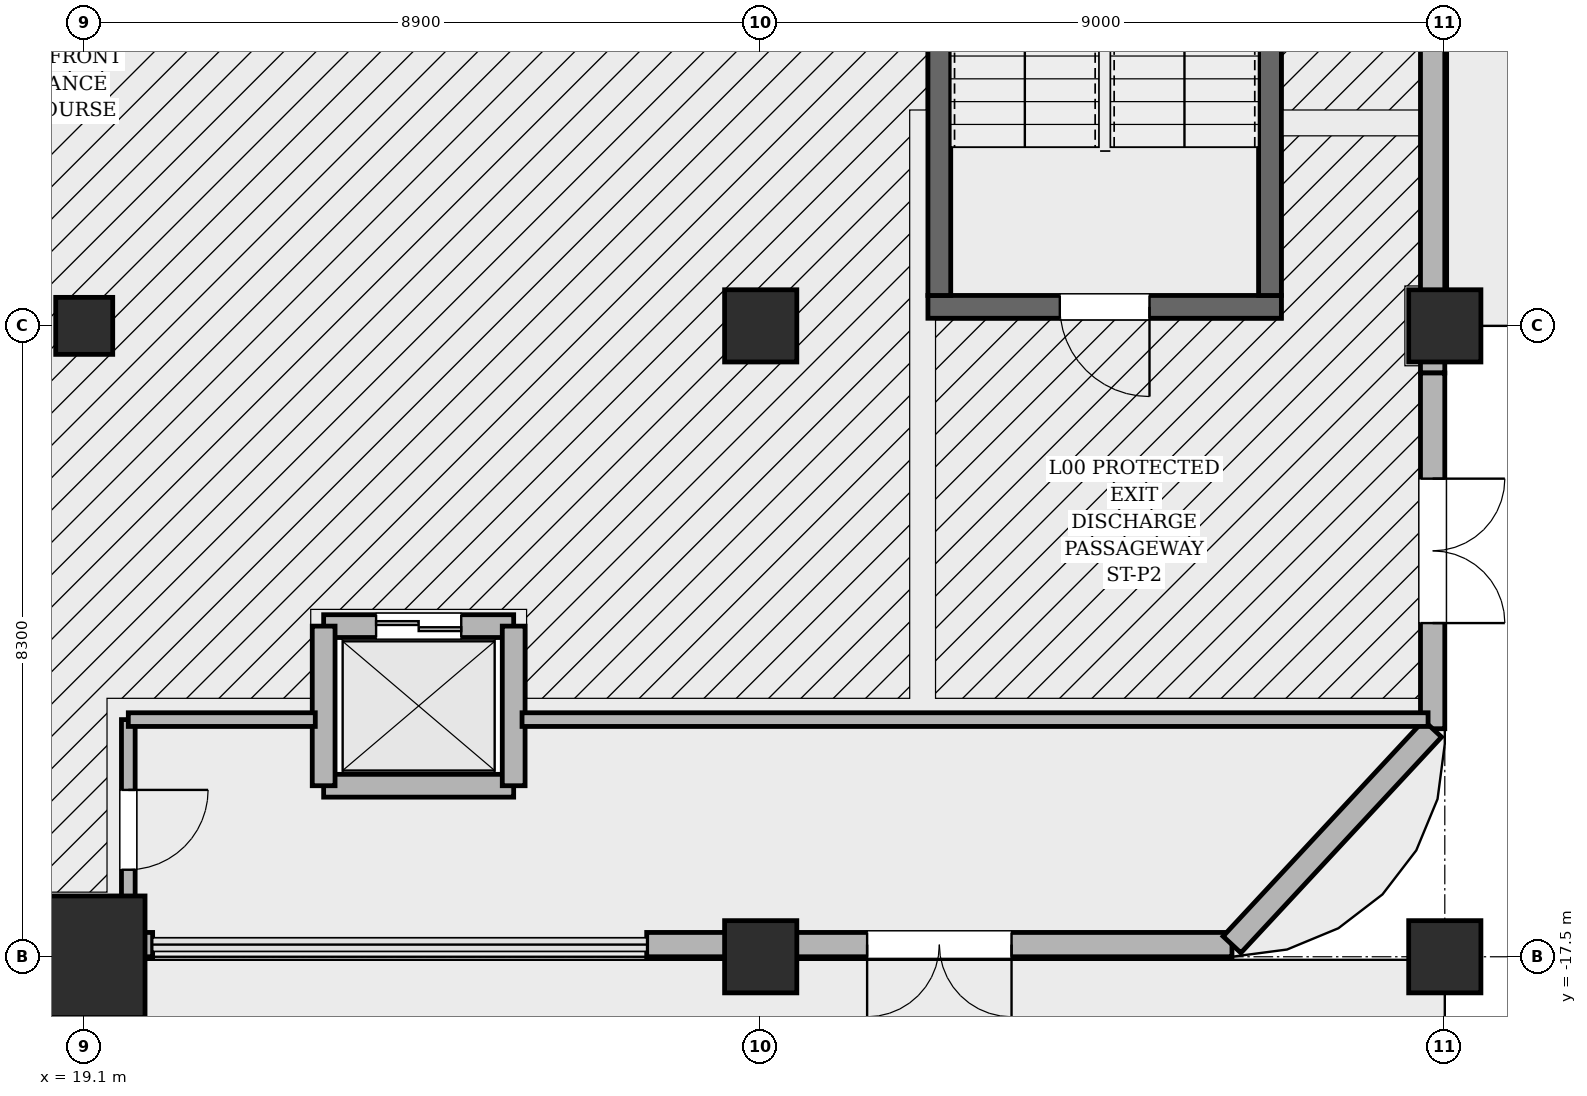
"""IFC4 building model, lengths in metres.
Left out: names, types, materials, properties, quantities, classifications, styles, units other than length and angle.
Written with IfcOpenShell. Run it as: python <this file> out.ifc"""

import sys

from ifc_helpers import new_model, si_unit, direction, frame, frame_2d, origin, origin_2d, place, context, subcontext, project, spatial, rectangle, hollow_rectangle, circle, extrude, element, fill, save


model = new_model("IFC4")
c1 = context("Model", 3, precision=1e-05, world=origin(), true_north=direction((0.0, 1.0)))
c2 = subcontext(c1, "Body", "Model", "MODEL_VIEW")
j1 = project(units=[si_unit("LENGTHUNIT", "METRE"), si_unit("PLANEANGLEUNIT", "RADIAN")], contexts=[c1])
p1 = place(None, origin())
s1 = spatial("IfcSite", under=j1, at=p1, CompositionType="ELEMENT")
p2 = place(p1, origin())
s2 = spatial("IfcBuilding", under=s1, at=p2, CompositionType="ELEMENT")
p3 = place(p2, origin())
s3 = spatial("IfcBuildingStorey", under=s2, at=p3, CompositionType="ELEMENT", Elevation=0.0)
p4 = place(p3, frame((30.2, -8.95, 0.0), z_axis=(0.0, 0.0, 1.0), x_axis=(1.0, 0.0, 0.0)))
e1 = element("IfcWall", 1, at=p4, inside=s3, PredefinedType="SOLIDWALL", context=c2, shape_type="SweptSolid", body=[
    extrude(rectangle(XDim=4.65, YDim=0.3, at=frame_2d((2.325, 0.0))), origin(), (0.0, 0.0, 1.0), 6.0),
])
p5 = place(p4, frame((1.735, 0.0, 0.0)))
e2 = element("IfcOpeningElement", 2, at=p5, cuts=e1, PredefinedType="OPENING", context=c2, shape_type="SweptSolid", body=[
    extrude(rectangle(XDim=1.18, YDim=2.2, at=frame_2d((0.59, 1.1))), frame((0.0, 0.16, 0.0), z_axis=(0.0, -1.0, 0.0), x_axis=(1.0, 0.0, 0.0)), (0.0, 0.0, 1.0), 0.32),
])
for number, where, z_axis, x_axis in (
    (3, (30.35, -8.8, 0.0), (0.0, 0.0, 1.0), (0.0, 1.0, 0.0)),
    (4, (34.7, 1.0, 0.0), (0.0, 0.0, 1.0), (0.0, -1.0, 0.0)),
):
    element("IfcWall", number, at=place(p3, frame(where, z_axis=z_axis, x_axis=x_axis)), inside=s3, PredefinedType="SOLIDWALL", context=c2, shape_type="SweptSolid", body=[
        extrude(rectangle(XDim=9.8, YDim=0.3, at=frame_2d((4.9, 0.0))), origin(), (0.0, 0.0, 1.0), 6.0),
    ])
p6 = place(p3, frame((19.1, -17.5, 0.0), z_axis=(0.0, 0.0, 1.0), x_axis=(1.0, 0.0, 0.0)))
e5 = element("IfcColumn", 5, at=p6, inside=s3, PredefinedType="COLUMN", context=c2, shape_type="SweptSolid", body=[
    extrude(hollow_rectangle(XDim=1.6, YDim=1.6, WallThickness=0.05, at=origin_2d()), origin(), (0.0, 0.0, 1.0), 6.0),
])
for number, where, z_axis, x_axis in (
    (6, (28.0, -17.5, 0.0), (0.0, 0.0, 1.0), (1.0, 0.0, 0.0)),
    (7, (37.0, -17.5, 0.0), (0.0, 0.0, 1.0), (1.0, 0.0, 0.0)),
    (8, (37.0, -9.2, 0.0), (0.0, 0.0, 1.0), (1.0, 0.0, 0.0)),
    (9, (28.0, -9.2, 0.0), (0.0, 0.0, 1.0), (1.0, 0.0, 0.0)),
):
    element("IfcColumn", number, at=place(p3, frame(where, z_axis=z_axis, x_axis=x_axis)), inside=s3, PredefinedType="COLUMN", context=c2, shape_type="SweptSolid", body=[
        extrude(rectangle(XDim=0.95, YDim=0.95, at=origin_2d()), origin(), (0.0, 0.0, 1.0), 6.0),
    ])
p7 = place(p3, frame((19.1, -9.2, 0.0), z_axis=(0.0, 0.0, 1.0), x_axis=(1.0, 0.0, 0.0)))
e10 = element("IfcColumn", 10, at=p7, inside=s3, PredefinedType="PILASTER", context=c2, shape_type="SweptSolid", body=[
    extrude(circle(Radius=0.375, at=origin_2d()), origin(), (0.0, 0.0, 1.0), 6.0),
])
p8 = place(p3, frame((20.0, -17.34, 0.0), z_axis=(0.0, 0.0, 1.0), x_axis=(-1.0, 0.0, 0.0)))
e11 = element("IfcWall", 11, at=p8, inside=s3, PredefinedType="SOLIDWALL", context=c2, shape_type="SweptSolid", body=[
    extrude(rectangle(XDim=1.8, YDim=0.32, at=frame_2d((0.9, 0.0))), origin(), (0.0, 0.0, 1.0), 5.014),
])
p9 = place(p3, frame((34.2, -17.34, 0.0), z_axis=(0.0, 0.0, 1.0), x_axis=(-1.0, 0.0, 0.0)))
e12 = element("IfcWall", 12, at=p9, inside=s3, PredefinedType="SOLIDWALL", context=c2, shape_type="SweptSolid", body=[
    extrude(rectangle(XDim=7.7, YDim=0.32, at=frame_2d((3.85, 0.0))), origin(), (0.0, 0.0, 1.0), 5.014),
])
p10 = place(p9, frame((2.9, 0.0, 0.0)))
e13 = element("IfcOpeningElement", 13, at=p10, cuts=e12, PredefinedType="OPENING", context=c2, shape_type="SweptSolid", body=[
    extrude(rectangle(XDim=1.9, YDim=2.4, at=frame_2d((0.95, 1.2))), frame((0.0, 0.17, 0.0), z_axis=(0.0, -1.0, 0.0), x_axis=(1.0, 0.0, 0.0)), (0.0, 0.0, 1.0), 0.34),
])
p11 = place(p3, frame((36.84, 9.82, 0.0), z_axis=(0.0, 0.0, 1.0), x_axis=(0.0, -1.0, 0.0)))
e14 = element("IfcWall", 14, at=p11, inside=s3, PredefinedType="SOLIDWALL", context=c2, shape_type="SweptSolid", body=[
    extrude(rectangle(XDim=19.64, YDim=0.32, at=frame_2d((9.82, 0.0))), origin(), (0.0, 0.0, 1.0), 5.014),
])
p12 = place(p3, frame((36.84, -9.82, 0.0), z_axis=(0.0, 0.0, 1.0), x_axis=(0.0, -1.0, 0.0)))
e15 = element("IfcWall", 15, at=p12, inside=s3, PredefinedType="SOLIDWALL", context=c2, shape_type="SweptSolid", body=[
    extrude(rectangle(XDim=4.68, YDim=0.32, at=frame_2d((2.34, 0.0))), origin(), (0.0, 0.0, 1.0), 5.164),
])
p13 = place(p12, frame((1.39, 0.0, 0.0)))
e16 = element("IfcOpeningElement", 16, at=p13, cuts=e15, PredefinedType="OPENING", context=c2, shape_type="SweptSolid", body=[
    extrude(rectangle(XDim=1.9, YDim=2.4, at=frame_2d((0.95, 1.2))), frame((0.0, 0.17, 0.0), z_axis=(0.0, -1.0, 0.0), x_axis=(1.0, 0.0, 0.0)), (0.0, 0.0, 1.0), 0.34),
])
p14 = place(p3, frame((36.84, -14.5, 0.0), z_axis=(0.0, 0.0, 1.0), x_axis=(-0.680854288177, -0.732418895354, 0.0)))
e17 = element("IfcWall", 17, at=p14, inside=s3, PredefinedType="SOLIDWALL", context=c2, shape_type="SweptSolid", body=[
    extrude(rectangle(XDim=3.878, YDim=0.32, at=frame_2d((1.939, 0.0))), origin(), (0.0, 0.0, 1.0), 5.014),
])
p15 = place(p3, frame((22.25, -13.15, 0.0), z_axis=(0.0, 0.0, 1.0), x_axis=(1.0, 0.0, 0.0)))
e18 = element("IfcWall", 18, at=p15, inside=s3, PredefinedType="SOLIDWALL", context=c2, shape_type="SweptSolid", body=[
    extrude(rectangle(XDim=2.5, YDim=0.3, at=frame_2d((1.25, 0.0))), origin(), (0.0, 0.0, 1.0), 5.72),
])
p16 = place(p15, frame((0.69, 0.0, 0.0)))
e19 = element("IfcOpeningElement", 19, at=p16, cuts=e18, PredefinedType="OPENING", context=c2, shape_type="SweptSolid", body=[
    extrude(rectangle(XDim=1.12, YDim=2.25, at=frame_2d((0.56, 1.125))), frame((0.0, 0.16, 0.0), z_axis=(0.0, -1.0, 0.0), x_axis=(1.0, 0.0, 0.0)), (0.0, 0.0, 1.0), 0.32),
])
p17 = place(p3, frame((22.25, -15.25, 0.0), z_axis=(0.0, 0.0, 1.0), x_axis=(1.0, 0.0, 0.0)))
e20 = element("IfcWall", 20, at=p17, inside=s3, PredefinedType="SOLIDWALL", context=c2, shape_type="SweptSolid", body=[
    extrude(rectangle(XDim=2.5, YDim=0.3, at=frame_2d((1.25, 0.0))), origin(), (0.0, 0.0, 1.0), 5.72),
])
for number, where, z_axis, x_axis in (
    (21, (22.25, -15.25, 0.0), (0.0, 0.0, 1.0), (0.0, 1.0, 0.0)),
    (22, (24.75, -15.25, 0.0), (0.0, 0.0, 1.0), (0.0, 1.0, 0.0)),
):
    element("IfcWall", number, at=place(p3, frame(where, z_axis=z_axis, x_axis=x_axis)), inside=s3, PredefinedType="SOLIDWALL", context=c2, shape_type="SweptSolid", body=[
        extrude(rectangle(XDim=2.1, YDim=0.3, at=frame_2d((1.05, 0.0))), origin(), (0.0, 0.0, 1.0), 5.72),
    ])
p18 = place(p3, frame((19.68, -17.28, 0.0), z_axis=(0.0, 0.0, 1.0), x_axis=(0.0, 1.0, 0.0)))
e23 = element("IfcWall", 23, at=p18, inside=s3, PredefinedType="PARTITIONING", context=c2, shape_type="SweptSolid", body=[
    extrude(rectangle(XDim=2.9, YDim=0.18, at=frame_2d((1.45, 0.0))), origin(), (0.0, 0.0, 1.0), 5.72),
])
p19 = place(p18, frame((0.925, 0.0, 0.0)))
e24 = element("IfcOpeningElement", 24, at=p19, cuts=e23, PredefinedType="OPENING", context=c2, shape_type="SweptSolid", body=[
    extrude(rectangle(XDim=1.05, YDim=2.2, at=frame_2d((0.525, 1.1))), frame((0.0, 0.1, 0.0), z_axis=(0.0, -1.0, 0.0), x_axis=(1.0, 0.0, 0.0)), (0.0, 0.0, 1.0), 0.2),
])
p20 = place(p3, frame((19.68, -14.38, 0.0), z_axis=(0.0, 0.0, 1.0), x_axis=(1.0, 0.0, 0.0)))
e25 = element("IfcWall", 25, at=p20, inside=s3, PredefinedType="PARTITIONING", context=c2, shape_type="SweptSolid", body=[
    extrude(rectangle(XDim=2.46, YDim=0.18, at=frame_2d((1.23, 0.0))), origin(), (0.0, 0.0, 1.0), 5.72),
])
p21 = place(p3, frame((24.86, -14.38, 0.0), z_axis=(0.0, 0.0, 1.0), x_axis=(1.0, 0.0, 0.0)))
e26 = element("IfcWall", 26, at=p21, inside=s3, PredefinedType="PARTITIONING", context=c2, shape_type="SweptSolid", body=[
    extrude(rectangle(XDim=11.92, YDim=0.18, at=frame_2d((5.96, 0.0))), origin(), (0.0, 0.0, 1.0), 5.014),
])
p22 = place(p10, origin())
e27 = element("IfcDoor", 27, at=p22, inside=s3, OperationType="DOUBLE_DOOR_SINGLE_SWING", PredefinedType="DOOR", context=c2, shape_type="SweptSolid", body=[
    extrude(rectangle(XDim=1.9, YDim=2.4, at=frame_2d((0.95, 1.2))), frame((0.0, 0.025, 0.0), z_axis=(0.0, -1.0, 0.0), x_axis=(1.0, 0.0, 0.0)), (0.0, 0.0, 1.0), 0.05),
])
fill(e13, e27)
p23 = place(p13, origin())
e28 = element("IfcDoor", 28, at=p23, inside=s3, OperationType="DOUBLE_DOOR_SINGLE_SWING", PredefinedType="DOOR", context=c2, shape_type="SweptSolid", body=[
    extrude(rectangle(XDim=1.9, YDim=2.4, at=frame_2d((0.95, 1.2))), frame((0.0, 0.025, 0.0), z_axis=(0.0, -1.0, 0.0), x_axis=(1.0, 0.0, 0.0)), (0.0, 0.0, 1.0), 0.05),
])
fill(e16, e28)
p24 = place(p5, origin())
e29 = element("IfcDoor", 29, at=p24, inside=s3, OperationType="SINGLE_SWING_RIGHT", PredefinedType="DOOR", context=c2, shape_type="SweptSolid", body=[
    extrude(rectangle(XDim=1.18, YDim=2.2, at=frame_2d((0.59, 1.1))), frame((0.0, 0.025, 0.0), z_axis=(0.0, -1.0, 0.0), x_axis=(1.0, 0.0, 0.0)), (0.0, 0.0, 1.0), 0.05),
])
fill(e2, e29)
p25 = place(p16, origin())
e30 = element("IfcDoor", 30, at=p25, inside=s3, OperationType="DOUBLE_DOOR_SLIDING", PredefinedType="DOOR", context=c2, shape_type="SweptSolid", body=[
    extrude(rectangle(XDim=1.12, YDim=2.25, at=frame_2d((0.56, 1.125))), frame((0.0, 0.025, 0.0), z_axis=(0.0, -1.0, 0.0), x_axis=(1.0, 0.0, 0.0)), (0.0, 0.0, 1.0), 0.05),
])
fill(e19, e30)
p26 = place(p19, origin())
e31 = element("IfcDoor", 31, at=p26, inside=s3, OperationType="SINGLE_SWING_RIGHT", PredefinedType="DOOR", context=c2, shape_type="SweptSolid", body=[
    extrude(rectangle(XDim=1.05, YDim=2.2, at=frame_2d((0.525, 1.1))), frame((0.0, 0.025, 0.0), z_axis=(0.0, -1.0, 0.0), x_axis=(1.0, 0.0, 0.0)), (0.0, 0.0, 1.0), 0.05),
])
fill(e24, e31)
save(model, sys.argv[1])
